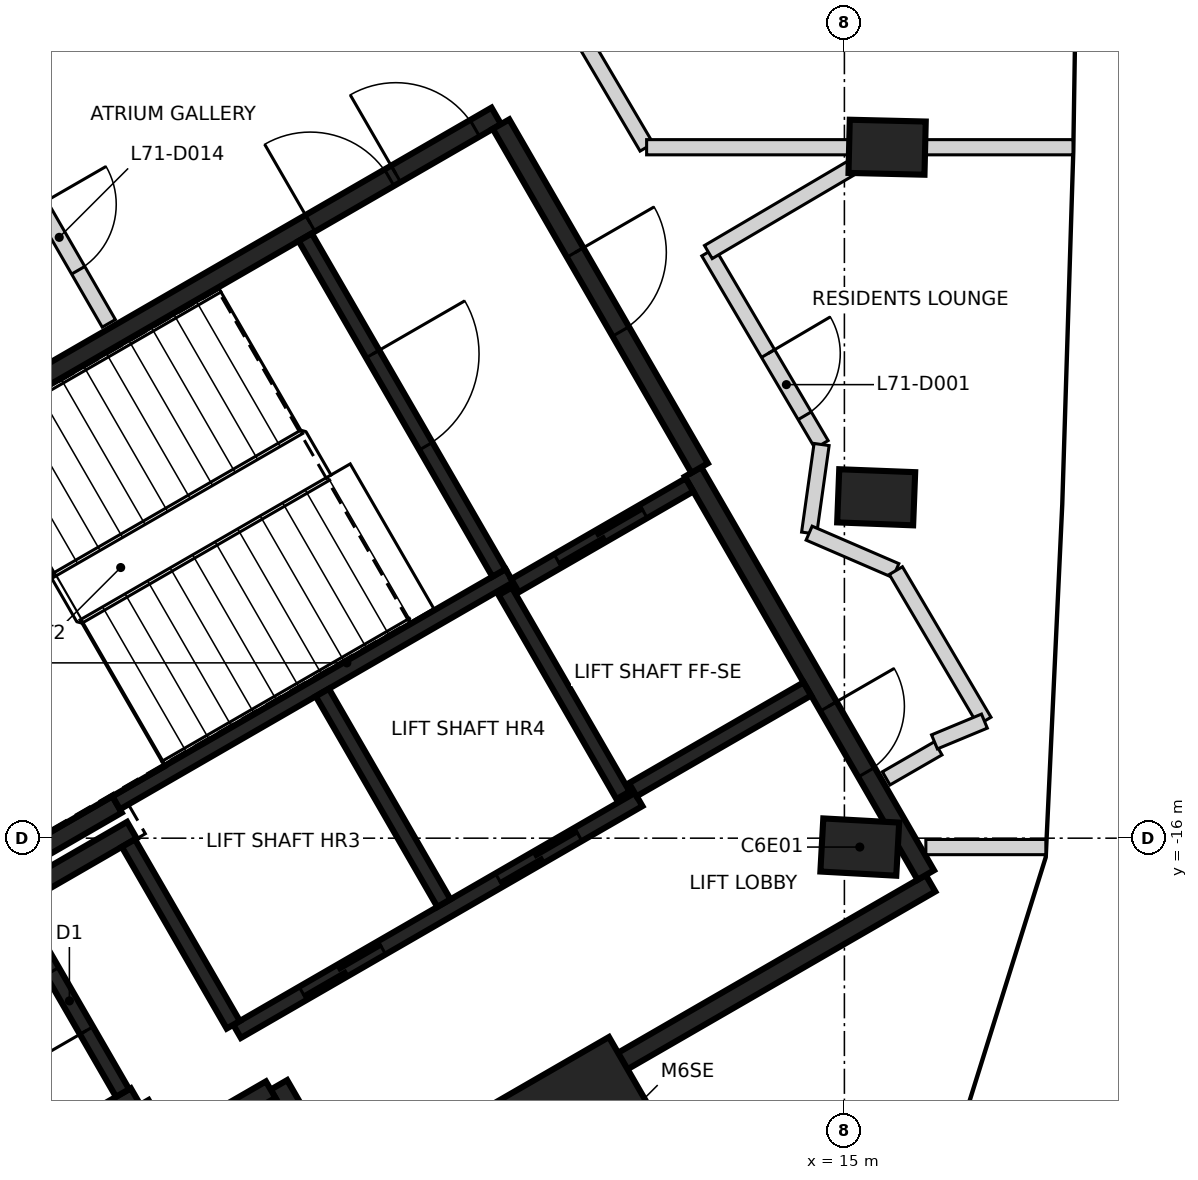
"""IFC4 building model, lengths in metres.
Left out: names, types, materials, properties, quantities, classifications, styles, units other than length and angle.
Written with IfcOpenShell. Run it as: python <this file> out.ifc"""

import sys

from ifc_helpers import new_model, si_unit, direction, frame, frame_2d, origin, origin_2d, place, context, subcontext, project, spatial, rectangle, extrude, element, fill, save


model = new_model("IFC4")
c1 = context("Model", 3, precision=1e-05, world=origin(), true_north=direction((0.0, 1.0)))
c2 = subcontext(c1, "Body", "Model", "MODEL_VIEW")
j1 = project(units=[si_unit("LENGTHUNIT", "METRE"), si_unit("PLANEANGLEUNIT", "RADIAN")], contexts=[c1])
p1 = place(None, origin())
s1 = spatial("IfcSite", under=j1, at=p1, CompositionType="ELEMENT")
p2 = place(p1, origin())
s2 = spatial("IfcBuilding", under=s1, at=p2, CompositionType="ELEMENT")
p3 = place(p2, frame((0.0, 0.0, 280.2)))
s3 = spatial("IfcBuildingStorey", under=s2, at=p3, CompositionType="ELEMENT", Elevation=280.2)
for number, where, z_axis, x_axis in (
    (1, (15.202, -16.117, -0.35), (0.0, 0.0, 1.0), (-0.998, 0.055, 0.0)),
    (2, (15.418, -11.515, -0.35), (0.0, 0.0, 1.0), (-0.999, 0.039, 0.0)),
    (3, (15.562, -6.91, -0.35), (0.0, 0.0, 1.0), (-1.0, 0.024, 0.0)),
):
    element("IfcColumn", number, at=place(p3, frame(where, z_axis=z_axis, x_axis=x_axis)), inside=s3, PredefinedType="COLUMN", context=c2, shape_type="SweptSolid", body=[
        extrude(rectangle(XDim=1.0, YDim=0.7, at=origin_2d()), origin(), (0.0, 0.0, 1.0), 3.6),
    ])
p4 = place(p3, frame((11.637, -20.155, -0.35), z_axis=(0.0, 0.0, 1.0), x_axis=(-0.5, 0.866025403784, 0.0)))
e4 = element("IfcColumn", 4, at=p4, inside=s3, PredefinedType="COLUMN", context=c2, shape_type="SweptSolid", body=[
    extrude(rectangle(XDim=2.4, YDim=2.0, at=origin_2d()), origin(), (0.0, 0.0, 1.0), 3.6),
])
p5 = place(p3, frame((0.417, -12.273, 0.0), z_axis=(0.0, 0.0, 1.0), x_axis=(0.866021906294, 0.500006057782, 0.0)))
e5 = element("IfcWall", 5, at=p5, inside=s3, PredefinedType="SHEAR", context=c2, shape_type="SweptSolid", body=[
    extrude(rectangle(XDim=11.55, YDim=0.25, at=frame_2d((5.775, 0.0))), origin(), (0.0, 0.0, 1.0), 3.25),
])
p6 = place(p5, frame((10.025, 0.0, 0.0)))
e6 = element("IfcOpeningElement", 6, at=p6, cuts=e5, PredefinedType="OPENING", context=c2, shape_type="SweptSolid", body=[
    extrude(rectangle(XDim=1.2, YDim=2.1, at=frame_2d((0.6, 1.05))), frame((0.0, 0.135, 0.0), z_axis=(0.0, -1.0, 0.0), x_axis=(1.0, 0.0, 0.0)), (0.0, 0.0, 1.0), 0.27),
])
p7 = place(p5, frame((8.725, 0.0, 0.0)))
e7 = element("IfcOpeningElement", 7, at=p7, cuts=e5, PredefinedType="OPENING", context=c2, shape_type="SweptSolid", body=[
    extrude(rectangle(XDim=1.2, YDim=2.1, at=frame_2d((0.6, 1.05))), frame((0.0, 0.135, 0.0), z_axis=(0.0, -1.0, 0.0), x_axis=(1.0, 0.0, 0.0)), (0.0, 0.0, 1.0), 0.27),
])
p8 = place(p3, frame((16.133, -16.594, 0.0), z_axis=(0.0, 0.0, 1.0), x_axis=(-0.866022959057, -0.500004234368, 0.0)))
e8 = element("IfcWall", 8, at=p8, inside=s3, PredefinedType="SHEAR", context=c2, shape_type="SweptSolid", body=[
    extrude(rectangle(XDim=8.75, YDim=0.25, at=frame_2d((4.375, 0.0))), origin(), (0.0, 0.0, 1.0), 3.25),
])
p9 = place(p3, frame((13.008, -11.181, 0.0), z_axis=(0.0, 0.0, 1.0), x_axis=(0.500001955336, -0.866024274868, 0.0)))
e9 = element("IfcWall", 9, at=p9, inside=s3, PredefinedType="SHEAR", context=c2, shape_type="SweptSolid", body=[
    extrude(rectangle(XDim=6.125, YDim=0.25, at=frame_2d((3.062, 0.0))), origin(), (0.0, 0.0, 1.0), 3.25),
])
p10 = place(p9, frame((3.563, 0.0, 0.0)))
e10 = element("IfcOpeningElement", 10, at=p10, cuts=e9, PredefinedType="OPENING", context=c2, shape_type="SweptSolid", body=[
    extrude(rectangle(XDim=1.0, YDim=2.1, at=frame_2d((0.5, 1.05))), frame((0.0, 0.135, 0.0), z_axis=(0.0, -1.0, 0.0), x_axis=(1.0, 0.0, 0.0)), (0.0, 0.0, 1.0), 0.27),
])
p11 = place(p3, frame((10.483, -6.606, 0.0), z_axis=(0.0, 0.0, 1.0), x_axis=(0.49999885962, -0.866026062182, 0.0)))
e11 = element("IfcWall", 11, at=p11, inside=s3, PredefinedType="SHEAR", context=c2, shape_type="SweptSolid", body=[
    extrude(rectangle(XDim=5.225, YDim=0.25, at=frame_2d((2.612, 0.0))), origin(), (0.0, 0.0, 1.0), 3.25),
])
p12 = place(p11, frame((1.95, 0.0, 0.0)))
e12 = element("IfcOpeningElement", 12, at=p12, cuts=e11, PredefinedType="OPENING", context=c2, shape_type="SweptSolid", body=[
    extrude(rectangle(XDim=1.2, YDim=2.1, at=frame_2d((0.6, 1.05))), frame((0.0, 0.135, 0.0), z_axis=(0.0, -1.0, 0.0), x_axis=(1.0, 0.0, 0.0)), (0.0, 0.0, 1.0), 0.27),
])
p13 = place(p3, frame((5.675, -19.399, 0.0), z_axis=(0.0, 0.0, 1.0), x_axis=(-0.866026637627, -0.499997862916, 0.0)))
e13 = element("IfcWall", 13, at=p13, inside=s3, PredefinedType="SHEAR", context=c2, shape_type="SweptSolid", body=[
    extrude(rectangle(XDim=2.865, YDim=0.25, at=frame_2d((1.432, 0.0))), origin(), (0.0, 0.0, 1.0), 3.25),
])
p14 = place(p3, frame((5.431, -15.556, 0.0), z_axis=(0.0, 0.0, 1.0), x_axis=(-0.866022940537, -0.500004266446, 0.0)))
e14 = element("IfcWall", 14, at=p14, inside=s3, PredefinedType="SHEAR", context=c2, shape_type="SweptSolid", body=[
    extrude(rectangle(XDim=2.575, YDim=0.25, at=frame_2d((1.287, 0.0))), origin(), (0.0, 0.0, 1.0), 3.25),
])
p15 = place(p3, frame((8.493, -20.86, 0.0), z_axis=(0.0, 0.0, 1.0), x_axis=(-0.500039802285, 0.866002422705, 0.0)))
e15 = element("IfcWall", 15, at=p15, inside=s3, PredefinedType="SHEAR", context=c2, shape_type="SweptSolid", body=[
    extrude(rectangle(XDim=1.865, YDim=0.25, at=frame_2d((0.932, 0.0))), origin(), (0.0, 0.0, 1.0), 3.25),
])
p16 = place(p3, frame((4.145, -16.749, 0.0), z_axis=(0.0, 0.0, 1.0), x_axis=(0.866038183914, 0.499977863513, 0.0)))
e16 = element("IfcWall", 16, at=p16, inside=s3, PredefinedType="SHEAR", context=c2, shape_type="SweptSolid", body=[
    extrude(rectangle(XDim=1.71, YDim=0.25, at=frame_2d((0.855, 0.0))), origin(), (0.0, 0.0, 1.0), 3.25),
])
p17 = place(p3, frame((7.452, -19.308, 0.0), z_axis=(0.0, 0.0, 1.0), x_axis=(-0.866044474677, -0.49996696679, 0.0)))
e17 = element("IfcWall", 17, at=p17, inside=s3, PredefinedType="SHEAR", context=c2, shape_type="SweptSolid", body=[
    extrude(rectangle(XDim=1.584, YDim=0.25, at=frame_2d((0.792, 0.0))), origin(), (0.0, 0.0, 1.0), 3.25),
])
p18 = place(p3, frame((6.017, -19.992, 0.0), z_axis=(0.0, 0.0, 1.0), x_axis=(-0.500364886717, 0.865814633822, 0.0)))
e18 = element("IfcWall", 18, at=p18, inside=s3, PredefinedType="SHEAR", context=c2, shape_type="SweptSolid", body=[
    extrude(rectangle(XDim=0.559, YDim=0.25, at=frame_2d((0.28, 0.0))), origin(), (0.0, 0.0, 1.0), 3.25),
])
p19 = place(p3, frame((5.419, -15.534, 0.0), z_axis=(0.0, 0.0, 1.0), x_axis=(0.866029065029, 0.499993658486, 0.0)))
e19 = element("IfcWall", 19, at=p19, inside=s3, PredefinedType="SHEAR", context=c2, shape_type="SweptSolid", body=[
    extrude(rectangle(XDim=5.974, YDim=0.2, at=frame_2d((2.987, 0.0))), origin(), (0.0, 0.0, 1.0), 3.25),
])
p20 = place(p3, frame((7.01, -18.542, 0.0), z_axis=(0.0, 0.0, 1.0), x_axis=(0.866030299012, 0.499991521122, 0.0)))
e20 = element("IfcWall", 20, at=p20, inside=s3, PredefinedType="SHEAR", context=c2, shape_type="SweptSolid", body=[
    extrude(rectangle(XDim=6.1, YDim=0.2, at=frame_2d((3.05, 0.0))), origin(), (0.0, 0.0, 1.0), 3.25),
])
p21 = place(p20, frame((1.0, 0.0, 0.0)))
e21 = element("IfcOpeningElement", 21, at=p21, cuts=e20, PredefinedType="OPENING", context=c2, shape_type="SweptSolid", body=[
    extrude(rectangle(XDim=1.2, YDim=2.1, at=frame_2d((0.6, 1.05))), frame((0.0, 0.11, 0.0), z_axis=(0.0, -1.0, 0.0), x_axis=(1.0, 0.0, 0.0)), (0.0, 0.0, 1.0), 0.22),
])
p22 = place(p20, frame((3.982, 0.0, 0.0)))
e22 = element("IfcOpeningElement", 22, at=p22, cuts=e20, PredefinedType="OPENING", context=c2, shape_type="SweptSolid", body=[
    extrude(rectangle(XDim=1.2, YDim=2.1, at=frame_2d((0.6, 1.05))), frame((0.0, 0.11, 0.0), z_axis=(0.0, -1.0, 0.0), x_axis=(1.0, 0.0, 0.0)), (0.0, 0.0, 1.0), 0.22),
])
p23 = place(p3, frame((7.906, -8.094, 0.0), z_axis=(0.0, 0.0, 1.0), x_axis=(0.500027839223, -0.866009330205, 0.0)))
e23 = element("IfcWall", 23, at=p23, inside=s3, PredefinedType="SHEAR", context=c2, shape_type="SweptSolid", body=[
    extrude(rectangle(XDim=5.098, YDim=0.2, at=frame_2d((2.549, 0.0))), origin(), (0.0, 0.0, 1.0), 3.25),
])
p24 = place(p23, frame((1.774, 0.0, 0.0)))
e24 = element("IfcOpeningElement", 24, at=p24, cuts=e23, PredefinedType="OPENING", context=c2, shape_type="SweptSolid", body=[
    extrude(rectangle(XDim=1.4, YDim=2.1, at=frame_2d((0.7, 1.05))), frame((0.0, 0.11, 0.0), z_axis=(0.0, -1.0, 0.0), x_axis=(1.0, 0.0, 0.0)), (0.0, 0.0, 1.0), 0.22),
])
p25 = place(p3, frame((8.132, -14.084, 0.0), z_axis=(0.0, 0.0, 1.0), x_axis=(0.499997778408, -0.866026686418, 0.0)))
e25 = element("IfcWall", 25, at=p25, inside=s3, PredefinedType="SHEAR", context=c2, shape_type="SweptSolid", body=[
    extrude(rectangle(XDim=3.198, YDim=0.2, at=frame_2d((1.599, 0.0))), origin(), (0.0, 0.0, 1.0), 3.25),
])
p26 = place(p3, frame((5.503, -19.352, 0.0), z_axis=(0.0, 0.0, 1.0), x_axis=(-0.499986818241, 0.866033014143, 0.0)))
e26 = element("IfcWall", 26, at=p26, inside=s3, PredefinedType="SHEAR", context=c2, shape_type="SweptSolid", body=[
    extrude(rectangle(XDim=2.798, YDim=0.2, at=frame_2d((1.399, 0.0))), origin(), (0.0, 0.0, 1.0), 3.25),
])
p27 = place(p26, frame((0.949, 0.0, 0.0)))
e27 = element("IfcOpeningElement", 27, at=p27, cuts=e26, PredefinedType="OPENING", context=c2, shape_type="SweptSolid", body=[
    extrude(rectangle(XDim=0.9, YDim=2.1, at=frame_2d((0.45, 1.05))), frame((0.0, 0.11, 0.0), z_axis=(0.0, -1.0, 0.0), x_axis=(1.0, 0.0, 0.0)), (0.0, 0.0, 1.0), 0.22),
])
p28 = place(p3, frame((6.96, -18.455, 0.0), z_axis=(0.0, 0.0, 1.0), x_axis=(-0.499926705758, 0.866067716099, 0.0)))
e28 = element("IfcWall", 28, at=p28, inside=s3, PredefinedType="SHEAR", context=c2, shape_type="SweptSolid", body=[
    extrude(rectangle(XDim=2.759, YDim=0.2, at=frame_2d((1.38, 0.0))), origin(), (0.0, 0.0, 1.0), 3.25),
])
p29 = place(p3, frame((12.088, -15.437, 0.0), z_axis=(0.0, 0.0, 1.0), x_axis=(-0.500026960575, 0.86600983753, 0.0)))
e29 = element("IfcWall", 29, at=p29, inside=s3, PredefinedType="SHEAR", context=c2, shape_type="SweptSolid", body=[
    extrude(rectangle(XDim=3.1, YDim=0.2, at=frame_2d((1.55, 0.0))), origin(), (0.0, 0.0, 1.0), 3.25),
])
p30 = place(p3, frame((10.666, -12.678, 0.0), z_axis=(0.0, 0.0, 1.0), x_axis=(0.866018407898, 0.500012117035, 0.0)))
e30 = element("IfcWall", 30, at=p30, inside=s3, PredefinedType="SHEAR", context=c2, shape_type="SweptSolid", body=[
    extrude(rectangle(XDim=2.651, YDim=0.2, at=frame_2d((1.325, 0.0))), origin(), (0.0, 0.0, 1.0), 3.25),
])
p31 = place(p30, frame((0.652, 0.0, 0.0)))
e31 = element("IfcOpeningElement", 31, at=p31, cuts=e30, PredefinedType="OPENING", context=c2, shape_type="SweptSolid", body=[
    extrude(rectangle(XDim=1.3, YDim=2.1, at=frame_2d((0.65, 1.05))), frame((0.0, 0.11, 0.0), z_axis=(0.0, -1.0, 0.0), x_axis=(1.0, 0.0, 0.0)), (0.0, 0.0, 1.0), 0.22),
])
p32 = place(p3, frame((14.512, -14.037, 0.0), z_axis=(0.0, 0.0, 1.0), x_axis=(-0.866018407898, -0.500012117035, 0.0)))
e32 = element("IfcWall", 32, at=p32, inside=s3, PredefinedType="SHEAR", context=c2, shape_type="SweptSolid", body=[
    extrude(rectangle(XDim=2.651, YDim=0.2, at=frame_2d((1.325, 0.0))), origin(), (0.0, 0.0, 1.0), 3.25),
])
p33 = place(p3, frame((3.987, -6.911, 0.0), z_axis=(0.0, 0.0, 1.0), x_axis=(0.499458942258, -0.866337558345, 0.0)))
e33 = element("IfcWall", 33, at=p33, inside=s3, PredefinedType="PARTITIONING", context=c2, shape_type="SweptSolid", body=[
    extrude(rectangle(XDim=2.674, YDim=0.2, at=frame_2d((1.337, 0.0))), origin(), (0.0, 0.0, 1.0), 3.25),
])
p34 = place(p33, frame((0.867, 0.0, 0.0)))
e34 = element("IfcOpeningElement", 34, at=p34, cuts=e33, PredefinedType="OPENING", context=c2, shape_type="SweptSolid", body=[
    extrude(rectangle(XDim=1.0, YDim=2.1, at=frame_2d((0.5, 1.05))), frame((0.0, 0.11, 0.0), z_axis=(0.0, -1.0, 0.0), x_axis=(1.0, 0.0, 0.0)), (0.0, 0.0, 1.0), 0.22),
])
p35 = place(p3, frame((11.571, -5.505, 0.0), z_axis=(0.0, 0.0, 1.0), x_axis=(0.507321116571, -0.86175709146, 0.0)))
e35 = element("IfcWall", 35, at=p35, inside=s3, PredefinedType="PARTITIONING", context=c2, shape_type="SweptSolid", body=[
    extrude(rectangle(XDim=1.63, YDim=0.2, at=frame_2d((0.815, 0.0))), origin(), (0.0, 0.0, 1.0), 3.25),
])
p36 = place(p3, frame((12.398, -6.91, 0.0), z_axis=(0.0, 0.0, 1.0), x_axis=(1.0, 0.0, 0.0)))
e36 = element("IfcWall", 36, at=p36, inside=s3, PredefinedType="PARTITIONING", context=c2, shape_type="SweptSolid", body=[
    extrude(rectangle(XDim=2.762, YDim=0.2, at=frame_2d((1.381, 0.0))), origin(), (0.0, 0.0, 1.0), 3.25),
])
p37 = place(p3, frame((13.21, -8.289, 0.0), z_axis=(0.0, 0.0, 1.0), x_axis=(0.507314348132, -0.861761076041, 0.0)))
e37 = element("IfcWall", 37, at=p37, inside=s3, PredefinedType="PARTITIONING", context=c2, shape_type="SweptSolid", body=[
    extrude(rectangle(XDim=2.937, YDim=0.2, at=frame_2d((1.469, 0.0))), origin(), (0.0, 0.0, 1.0), 3.25),
])
p38 = place(p37, frame((1.549, 0.0, 0.0)))
e38 = element("IfcOpeningElement", 38, at=p38, cuts=e37, PredefinedType="OPENING", context=c2, shape_type="SweptSolid", body=[
    extrude(rectangle(XDim=0.95, YDim=2.1, at=frame_2d((0.475, 1.05))), frame((0.0, 0.11, 0.0), z_axis=(0.0, -1.0, 0.0), x_axis=(1.0, 0.0, 0.0)), (0.0, 0.0, 1.0), 0.22),
])
p39 = place(p3, frame((13.21, -8.289, 0.0), z_axis=(0.0, 0.0, 1.0), x_axis=(0.861654599216, 0.507495174017, 0.0)))
e39 = element("IfcWall", 39, at=p39, inside=s3, PredefinedType="PARTITIONING", context=c2, shape_type="SweptSolid", body=[
    extrude(rectangle(XDim=2.38, YDim=0.2, at=frame_2d((1.19, 0.0))), origin(), (0.0, 0.0, 1.0), 3.25),
])
p40 = place(p3, frame((14.536, -11.987, 0.0), z_axis=(0.0, 0.0, 1.0), x_axis=(0.139331074948, 0.990245854096, 0.0)))
e40 = element("IfcWall", 40, at=p40, inside=s3, PredefinedType="PARTITIONING", context=c2, shape_type="SweptSolid", body=[
    extrude(rectangle(XDim=1.177, YDim=0.2, at=frame_2d((0.589, 0.0))), origin(), (0.0, 0.0, 1.0), 3.25),
])
p41 = place(p3, frame((14.536, -11.987, 0.0), z_axis=(0.0, 0.0, 1.0), x_axis=(0.918013607861, -0.396548881958, 0.0)))
e41 = element("IfcWall", 41, at=p41, inside=s3, PredefinedType="PARTITIONING", context=c2, shape_type="SweptSolid", body=[
    extrude(rectangle(XDim=1.243, YDim=0.2, at=frame_2d((0.622, 0.0))), origin(), (0.0, 0.0, 1.0), 2.35),
])
p42 = place(p3, frame((15.55, -15.213, 0.0), z_axis=(0.0, 0.0, 1.0), x_axis=(0.865989998118, 0.500061319399, 0.0)))
e42 = element("IfcWall", 42, at=p42, inside=s3, PredefinedType="PARTITIONING", context=c2, shape_type="SweptSolid", body=[
    extrude(rectangle(XDim=0.79, YDim=0.2, at=frame_2d((0.395, 0.0))), origin(), (0.0, 0.0, 1.0), 3.25),
])
p43 = place(p3, frame((15.677, -12.48, 0.0), z_axis=(0.0, 0.0, 1.0), x_axis=(0.507256975253, -0.861794848591, 0.0)))
e43 = element("IfcWall", 43, at=p43, inside=s3, PredefinedType="PARTITIONING", context=c2, shape_type="SweptSolid", body=[
    extrude(rectangle(XDim=2.297, YDim=0.2, at=frame_2d((1.148, 0.0))), origin(), (0.0, 0.0, 1.0), 3.25),
])
p44 = place(p3, frame((16.185, -14.733, 0.0), z_axis=(0.0, 0.0, 1.0), x_axis=(0.923472400107, 0.38366486188, 0.0)))
e44 = element("IfcWall", 44, at=p44, inside=s3, PredefinedType="PARTITIONING", context=c2, shape_type="SweptSolid", body=[
    extrude(rectangle(XDim=0.711, YDim=0.2, at=frame_2d((0.356, 0.0))), origin(), (0.0, 0.0, 1.0), 3.25),
])
p45 = place(p3, frame((15.161, -6.91, 0.0), z_axis=(0.0, 0.0, 1.0), x_axis=(1.0, 0.0, 0.0)))
e45 = element("IfcWall", 45, at=p45, inside=s3, PredefinedType="PARTITIONING", context=c2, shape_type="SweptSolid", body=[
    extrude(rectangle(XDim=2.846, YDim=0.2, at=frame_2d((1.423, 0.0))), origin(), (0.0, 0.0, 1.0), 3.25),
])
p46 = place(p3, frame((16.072, -16.117, 0.0), z_axis=(0.0, 0.0, 1.0), x_axis=(1.0, 0.0, 0.0)))
e46 = element("IfcWall", 46, at=p46, inside=s3, PredefinedType="PARTITIONING", context=c2, shape_type="SweptSolid", body=[
    extrude(rectangle(XDim=1.578, YDim=0.2, at=frame_2d((0.789, 0.0))), origin(), (0.0, 0.0, 1.0), 3.25),
])
p47 = place(p31, origin())
e47 = element("IfcDoor", 47, at=p47, inside=s3, OperationType="SLIDING_TO_RIGHT", PredefinedType="DOOR", context=c2, shape_type="SweptSolid", body=[
    extrude(rectangle(XDim=1.3, YDim=2.1, at=frame_2d((0.65, 1.05))), frame((0.0, 0.025, 0.0), z_axis=(0.0, -1.0, 0.0), x_axis=(1.0, 0.0, 0.0)), (0.0, 0.0, 1.0), 0.05),
])
fill(e31, e47)
p48 = place(p21, origin())
e48 = element("IfcDoor", 48, at=p48, inside=s3, OperationType="DOUBLE_DOOR_SLIDING", PredefinedType="DOOR", context=c2, shape_type="SweptSolid", body=[
    extrude(rectangle(XDim=1.2, YDim=2.1, at=frame_2d((0.6, 1.05))), frame((0.0, 0.025, 0.0), z_axis=(0.0, -1.0, 0.0), x_axis=(1.0, 0.0, 0.0)), (0.0, 0.0, 1.0), 0.05),
])
fill(e21, e48)
p49 = place(p22, origin())
e49 = element("IfcDoor", 49, at=p49, inside=s3, OperationType="DOUBLE_DOOR_SLIDING", PredefinedType="DOOR", context=c2, shape_type="SweptSolid", body=[
    extrude(rectangle(XDim=1.2, YDim=2.1, at=frame_2d((0.6, 1.05))), frame((0.0, 0.025, 0.0), z_axis=(0.0, -1.0, 0.0), x_axis=(1.0, 0.0, 0.0)), (0.0, 0.0, 1.0), 0.05),
])
fill(e22, e49)
p50 = place(p10, origin())
e50 = element("IfcDoor", 50, at=p50, inside=s3, OperationType="SINGLE_SWING_LEFT", PredefinedType="DOOR", context=c2, shape_type="SweptSolid", body=[
    extrude(rectangle(XDim=1.0, YDim=2.1, at=frame_2d((0.5, 1.05))), frame((0.0, 0.025, 0.0), z_axis=(0.0, -1.0, 0.0), x_axis=(1.0, 0.0, 0.0)), (0.0, 0.0, 1.0), 0.05),
])
fill(e10, e50)
p51 = place(p6, origin())
e51 = element("IfcDoor", 51, at=p51, inside=s3, OperationType="SINGLE_SWING_LEFT", PredefinedType="DOOR", context=c2, shape_type="SweptSolid", body=[
    extrude(rectangle(XDim=1.2, YDim=2.1, at=frame_2d((0.6, 1.05))), frame((0.0, 0.025, 0.0), z_axis=(0.0, -1.0, 0.0), x_axis=(1.0, 0.0, 0.0)), (0.0, 0.0, 1.0), 0.05),
])
fill(e6, e51)
p52 = place(p7, origin())
e52 = element("IfcDoor", 52, at=p52, inside=s3, OperationType="SINGLE_SWING_RIGHT", PredefinedType="DOOR", context=c2, shape_type="SweptSolid", body=[
    extrude(rectangle(XDim=1.2, YDim=2.1, at=frame_2d((0.6, 1.05))), frame((0.0, 0.025, 0.0), z_axis=(0.0, -1.0, 0.0), x_axis=(1.0, 0.0, 0.0)), (0.0, 0.0, 1.0), 0.05),
])
fill(e7, e52)
p53 = place(p24, origin())
e53 = element("IfcDoor", 53, at=p53, inside=s3, OperationType="SINGLE_SWING_RIGHT", PredefinedType="DOOR", context=c2, shape_type="SweptSolid", body=[
    extrude(rectangle(XDim=1.4, YDim=2.1, at=frame_2d((0.7, 1.05))), frame((0.0, 0.025, 0.0), z_axis=(0.0, -1.0, 0.0), x_axis=(1.0, 0.0, 0.0)), (0.0, 0.0, 1.0), 0.05),
])
fill(e24, e53)
p54 = place(p27, origin())
e54 = element("IfcDoor", 54, at=p54, inside=s3, OperationType="SINGLE_SWING_LEFT", PredefinedType="DOOR", context=c2, shape_type="SweptSolid", body=[
    extrude(rectangle(XDim=0.9, YDim=2.1, at=frame_2d((0.45, 1.05))), frame((0.0, 0.025, 0.0), z_axis=(0.0, -1.0, 0.0), x_axis=(1.0, 0.0, 0.0)), (0.0, 0.0, 1.0), 0.05),
])
fill(e27, e54)
p55 = place(p12, origin())
e55 = element("IfcDoor", 55, at=p55, inside=s3, OperationType="SINGLE_SWING_LEFT", PredefinedType="DOOR", context=c2, shape_type="SweptSolid", body=[
    extrude(rectangle(XDim=1.2, YDim=2.1, at=frame_2d((0.6, 1.05))), frame((0.0, 0.025, 0.0), z_axis=(0.0, -1.0, 0.0), x_axis=(1.0, 0.0, 0.0)), (0.0, 0.0, 1.0), 0.05),
])
fill(e12, e55)
p56 = place(p38, origin())
e56 = element("IfcDoor", 56, at=p56, inside=s3, OperationType="SINGLE_SWING_LEFT", PredefinedType="DOOR", context=c2, shape_type="SweptSolid", body=[
    extrude(rectangle(XDim=0.95, YDim=2.1, at=frame_2d((0.475, 1.05))), frame((0.0, 0.025, 0.0), z_axis=(0.0, -1.0, 0.0), x_axis=(1.0, 0.0, 0.0)), (0.0, 0.0, 1.0), 0.05),
])
fill(e38, e56)
p57 = place(p34, frame((1.0, 0.0, 0.0), z_axis=(0.0, 0.0, 1.0), x_axis=(-1.0, 0.0, 0.0)))
e57 = element("IfcDoor", 57, at=p57, inside=s3, OperationType="SINGLE_SWING_LEFT", PredefinedType="DOOR", context=c2, shape_type="SweptSolid", body=[
    extrude(rectangle(XDim=1.0, YDim=2.1, at=frame_2d((0.5, 1.05))), frame((0.0, 0.025, 0.0), z_axis=(0.0, -1.0, 0.0), x_axis=(1.0, 0.0, 0.0)), (0.0, 0.0, 1.0), 0.05),
])
fill(e34, e57)
save(model, sys.argv[1])
